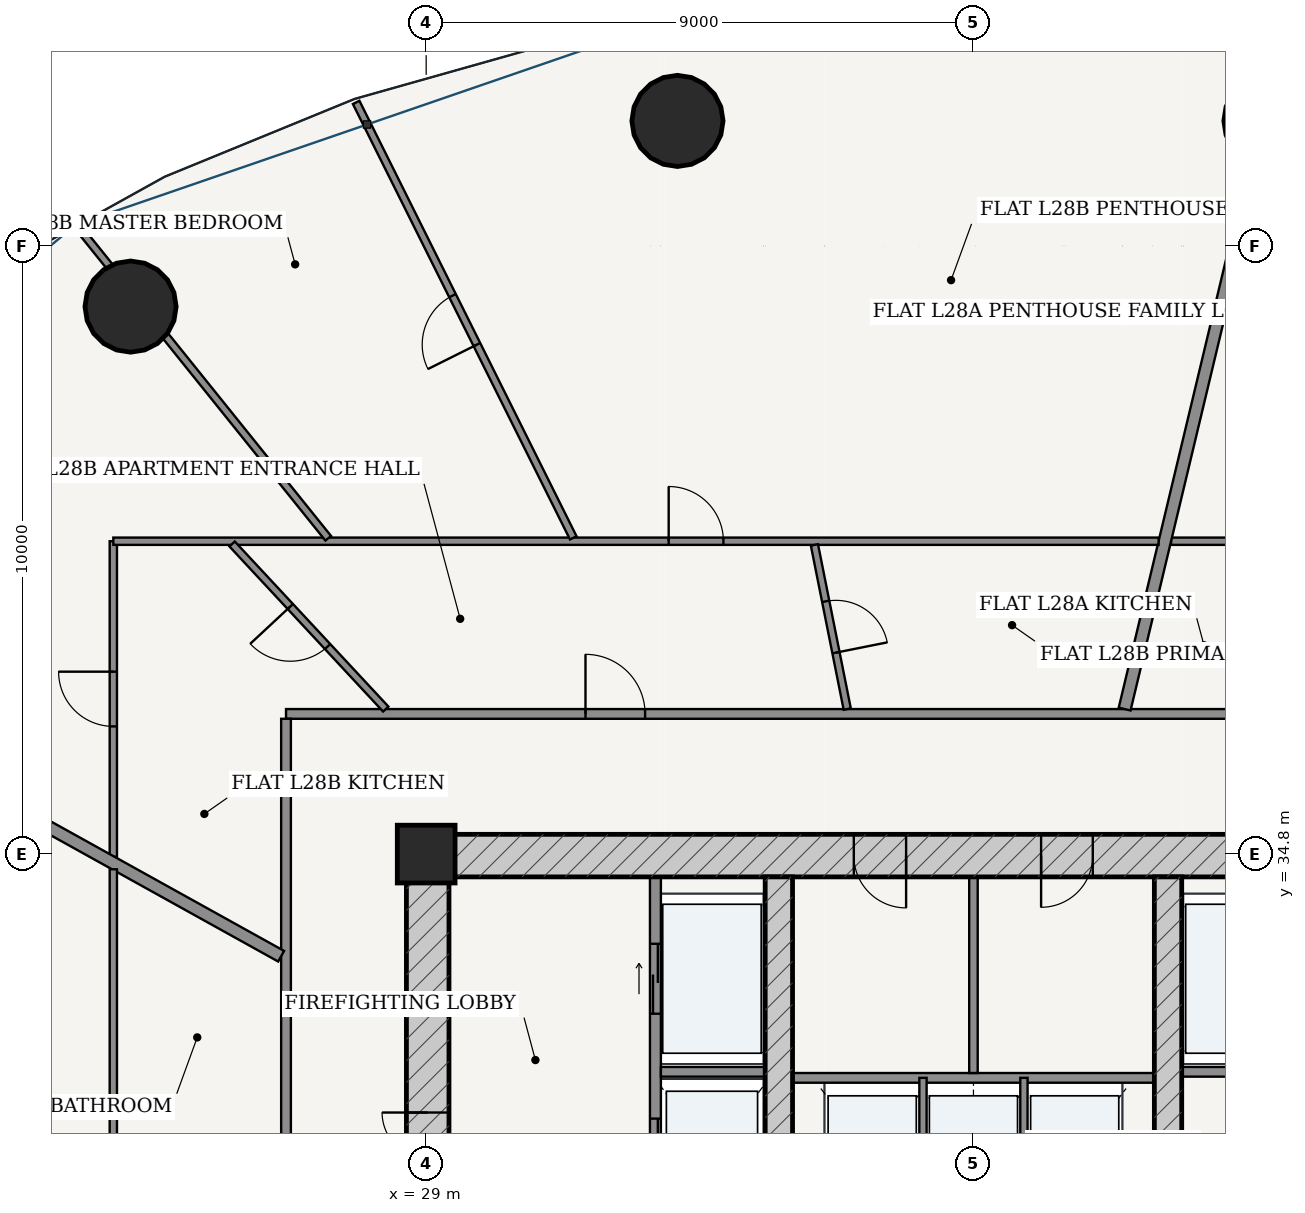
"""IFC4 building model, lengths in metres.
Left out: names, types, materials, properties, quantities, classifications, styles, units other than length and angle.
Written with IfcOpenShell. Run it as: python <this file> out.ifc"""

import sys

from ifc_helpers import new_model, si_unit, direction, frame, frame_2d, origin, origin_2d, place, context, subcontext, project, spatial, rectangle, hollow_circle, extrude, source, transform, mapped, element, fill, save


model = new_model("IFC4")
c1 = context("Model", 3, precision=1e-05, world=origin(), true_north=direction((-0.2419218956, 0.970295726276)))
c2 = subcontext(c1, "Body", "Model", "MODEL_VIEW")
j1 = project(units=[si_unit("LENGTHUNIT", "METRE"), si_unit("PLANEANGLEUNIT", "RADIAN")], contexts=[c1])
p1 = place(None, origin())
s1 = spatial("IfcSite", under=j1, at=p1, CompositionType="ELEMENT")
p2 = place(p1, origin())
s2 = spatial("IfcBuilding", under=s1, at=p2, CompositionType="ELEMENT")
p3 = place(p2, frame((0.0, 0.0, 108.6)))
s3 = spatial("IfcBuildingStorey", under=s2, at=p3, CompositionType="ELEMENT", Elevation=108.6)
p4 = place(p3, frame((29.0, 34.8, 0.0), z_axis=(0.0, 0.0, 1.0), x_axis=(1.0, 0.0, 0.0)))
e1 = element("IfcColumn", 1, at=p4, inside=s3, PredefinedType="COLUMN", context=c2, shape_type="SweptSolid", body=[
    extrude(rectangle(XDim=0.95, YDim=0.95, at=origin_2d()), origin(), (0.0, 0.0, 1.0), 3.6),
])
p5 = place(p3, frame((28.675, 34.775, 0.0), z_axis=(0.0, 0.0, 1.0), x_axis=(1.0, 0.0, 0.0)))
e2 = element("IfcWall", 2, at=p5, inside=s3, PredefinedType="SHEAR", context=c2, shape_type="SweptSolid", body=[
    extrude(rectangle(XDim=18.65, YDim=0.7, at=frame_2d((9.325, 0.0))), origin(), (0.0, 0.0, 1.0), 3.325),
])
p6 = place(p5, frame((7.357, 0.0, 0.0)))
e3 = element("IfcOpeningElement", 3, at=p6, cuts=e2, PredefinedType="OPENING", context=c2, shape_type="SweptSolid", body=[
    extrude(rectangle(XDim=0.86, YDim=2.1, at=frame_2d((0.43, 1.05))), frame((0.0, 0.36, 0.0), z_axis=(0.0, -1.0, 0.0), x_axis=(1.0, 0.0, 0.0)), (0.0, 0.0, 1.0), 0.72),
])
p7 = place(p5, frame((10.438, 0.0, 0.0)))
e4 = element("IfcOpeningElement", 4, at=p7, cuts=e2, PredefinedType="OPENING", context=c2, shape_type="SweptSolid", body=[
    extrude(rectangle(XDim=0.85, YDim=2.1, at=frame_2d((0.425, 1.05))), frame((0.0, 0.36, 0.0), z_axis=(0.0, -1.0, 0.0), x_axis=(1.0, 0.0, 0.0)), (0.0, 0.0, 1.0), 0.72),
])
p8 = place(p3, frame((29.025, 19.175, 0.0), z_axis=(0.0, 0.0, 1.0), x_axis=(0.0, 1.0, 0.0)))
e5 = element("IfcWall", 5, at=p8, inside=s3, PredefinedType="SHEAR", context=c2, shape_type="SweptSolid", body=[
    extrude(rectangle(XDim=15.25, YDim=0.7, at=frame_2d((7.625, 0.0))), origin(), (0.0, 0.0, 1.0), 3.325),
])
p9 = place(p8, frame((9.875, 0.0, 0.0)))
e6 = element("IfcOpeningElement", 6, at=p9, cuts=e5, PredefinedType="OPENING", context=c2, shape_type="SweptSolid", body=[
    extrude(rectangle(XDim=1.5, YDim=2.2, at=frame_2d((0.75, 1.1))), frame((0.0, 0.36, 0.0), z_axis=(0.0, -1.0, 0.0), x_axis=(1.0, 0.0, 0.0)), (0.0, 0.0, 1.0), 0.72),
])
p10 = place(p3, frame((34.8, 19.175, 0.0), z_axis=(0.0, 0.0, 1.0), x_axis=(0.0, 1.0, 0.0)))
e7 = element("IfcWall", 7, at=p10, inside=s3, PredefinedType="SHEAR", context=c2, shape_type="SweptSolid", body=[
    extrude(rectangle(XDim=15.25, YDim=0.45, at=frame_2d((7.625, 0.0))), origin(), (0.0, 0.0, 1.0), 3.325),
])
p11 = place(p10, frame((7.8, 0.0, 0.0)))
e8 = element("IfcOpeningElement", 8, at=p11, cuts=e7, PredefinedType="OPENING", context=c2, shape_type="SweptSolid", body=[
    extrude(rectangle(XDim=1.05, YDim=2.15, at=frame_2d((0.525, 1.075))), frame((0.0, 0.235, 0.0), z_axis=(0.0, -1.0, 0.0), x_axis=(1.0, 0.0, 0.0)), (0.0, 0.0, 1.0), 0.47),
])
p12 = place(p3, frame((41.2, 19.175, 0.0), z_axis=(0.0, 0.0, 1.0), x_axis=(0.0, 1.0, 0.0)))
e9 = element("IfcWall", 9, at=p12, inside=s3, PredefinedType="SHEAR", context=c2, shape_type="SweptSolid", body=[
    extrude(rectangle(XDim=15.25, YDim=0.45, at=frame_2d((7.625, 0.0))), origin(), (0.0, 0.0, 1.0), 3.325),
])
p13 = place(p12, frame((7.8, 0.0, 0.0)))
e10 = element("IfcOpeningElement", 10, at=p13, cuts=e9, PredefinedType="OPENING", context=c2, shape_type="SweptSolid", body=[
    extrude(rectangle(XDim=1.05, YDim=2.15, at=frame_2d((0.525, 1.075))), frame((0.0, 0.235, 0.0), z_axis=(0.0, -1.0, 0.0), x_axis=(1.0, 0.0, 0.0)), (0.0, 0.0, 1.0), 0.47),
])
for number, where, z_axis, x_axis in (
    (11, (42.867, 46.857, 0.0), (0.0, 0.0, 1.0), (1.0, 0.0, 0.0)),
    (12, (33.133, 46.857, 0.0), (0.0, 0.0, 1.0), (1.0, 0.0, 0.0)),
    (13, (24.138, 43.803, 0.0), (0.0, 0.0, 1.0), (1.0, 0.0, 0.0)),
):
    element("IfcColumn", number, at=place(p3, frame(where, z_axis=z_axis, x_axis=x_axis)), inside=s3, PredefinedType="COLUMN", context=c2, shape_type="SweptSolid", body=[
        extrude(hollow_circle(Radius=0.75, WallThickness=0.045, at=origin_2d()), origin(), (0.0, 0.0, 1.0), 3.6),
    ])
p14 = place(p3, frame((32.77, 28.52, 0.0), z_axis=(0.0, 0.0, 1.0), x_axis=(0.0, 1.0, 0.0)))
e14 = element("IfcWall", 14, at=p14, inside=s3, PredefinedType="PARTITIONING", context=c2, shape_type="SweptSolid", body=[
    extrude(rectangle(XDim=5.905, YDim=0.18, at=frame_2d((2.953, 0.0))), origin(), (0.0, 0.0, 1.0), 3.325),
])
p15 = place(p14, frame((3.655, 0.0, 0.0)))
e15 = element("IfcOpeningElement", 15, at=p15, cuts=e14, PredefinedType="OPENING", context=c2, shape_type="SweptSolid", body=[
    extrude(rectangle(XDim=1.15, YDim=2.2, at=frame_2d((0.575, 1.1))), frame((0.0, 0.1, 0.0), z_axis=(0.0, -1.0, 0.0), x_axis=(1.0, 0.0, 0.0)), (0.0, 0.0, 1.0), 0.2),
])
p16 = place(p14, frame((0.73, 0.0, 0.0)))
e16 = element("IfcOpeningElement", 16, at=p16, cuts=e14, PredefinedType="OPENING", context=c2, shape_type="SweptSolid", body=[
    extrude(rectangle(XDim=1.2, YDim=2.25, at=frame_2d((0.6, 1.125))), frame((0.0, 0.1, 0.0), z_axis=(0.0, -1.0, 0.0), x_axis=(1.0, 0.0, 0.0)), (0.0, 0.0, 1.0), 0.2),
])
for number, where, z_axis, x_axis in (
    (17, (32.86, 31.22, 0.0), (0.0, 0.0, 1.0), (1.0, 0.0, 0.0)),
    (18, (41.425, 31.22, 0.0), (0.0, 0.0, 1.0), (1.0, 0.0, 0.0)),
):
    element("IfcWall", number, at=place(p3, frame(where, z_axis=z_axis, x_axis=x_axis)), inside=s3, PredefinedType="PARTITIONING", context=c2, shape_type="SweptSolid", body=[
        extrude(rectangle(XDim=1.715, YDim=0.16, at=frame_2d((0.857, 0.0))), origin(), (0.0, 0.0, 1.0), 3.325),
    ])
p17 = place(p3, frame((35.025, 31.12, 0.0), z_axis=(0.0, 0.0, 1.0), x_axis=(1.0, 0.0, 0.0)))
e19 = element("IfcWall", 19, at=p17, inside=s3, PredefinedType="PARTITIONING", context=c2, shape_type="SweptSolid", body=[
    extrude(rectangle(XDim=5.95, YDim=0.16, at=frame_2d((2.975, 0.0))), origin(), (0.0, 0.0, 1.0), 3.325),
])
for number, where, z_axis, x_axis in (
    (20, (37.17, 28.56, 0.0), (0.0, 0.0, 1.0), (0.0, 1.0, 0.0)),
    (21, (38.83, 28.56, 0.0), (0.0, 0.0, 1.0), (0.0, 1.0, 0.0)),
):
    element("IfcWall", number, at=place(p3, frame(where, z_axis=z_axis, x_axis=x_axis)), inside=s3, PredefinedType="PARTITIONING", context=c2, shape_type="SweptSolid", body=[
        extrude(rectangle(XDim=2.56, YDim=0.12, at=frame_2d((1.28, 0.0))), origin(), (0.0, 0.0, 1.0), 3.325),
    ])
p18 = place(p3, frame((38.0, 31.2, 0.0), z_axis=(0.0, 0.0, 1.0), x_axis=(0.0, 1.0, 0.0)))
e22 = element("IfcWall", 22, at=p18, inside=s3, PredefinedType="PARTITIONING", context=c2, shape_type="SweptSolid", body=[
    extrude(rectangle(XDim=3.225, YDim=0.14, at=frame_2d((1.613, 0.0))), origin(), (0.0, 0.0, 1.0), 3.325),
])
p19 = place(p3, frame((26.695, 37.105, 0.0), z_axis=(0.0, 0.0, 1.0), x_axis=(1.0, 0.0, 0.0)))
e23 = element("IfcWall", 23, at=p19, inside=s3, PredefinedType="PARTITIONING", context=c2, shape_type="SweptSolid", body=[
    extrude(rectangle(XDim=22.61, YDim=0.16, at=frame_2d((11.305, 0.0))), origin(), (0.0, 0.0, 1.0), 2.767),
])
p20 = place(p19, frame((4.925, 0.0, 0.0)))
e24 = element("IfcOpeningElement", 24, at=p20, cuts=e23, PredefinedType="OPENING", context=c2, shape_type="SweptSolid", body=[
    extrude(rectangle(XDim=0.98, YDim=2.2, at=frame_2d((0.49, 1.1))), frame((0.0, 0.09, 0.0), z_axis=(0.0, -1.0, 0.0), x_axis=(1.0, 0.0, 0.0)), (0.0, 0.0, 1.0), 0.18),
])
p21 = place(p3, frame((26.695, 16.575, 0.0), z_axis=(0.0, 0.0, 1.0), x_axis=(0.0, 1.0, 0.0)))
e25 = element("IfcWall", 25, at=p21, inside=s3, PredefinedType="PARTITIONING", context=c2, shape_type="SweptSolid", body=[
    extrude(rectangle(XDim=20.45, YDim=0.16, at=frame_2d((10.225, 0.0))), origin(), (0.0, 0.0, 1.0), 2.767),
])
p22 = place(p21, frame((9.547, 0.0, 0.0)))
e26 = element("IfcOpeningElement", 26, at=p22, cuts=e25, PredefinedType="OPENING", context=c2, shape_type="SweptSolid", body=[
    extrude(rectangle(XDim=0.98, YDim=2.2, at=frame_2d((0.49, 1.1))), frame((0.0, 0.09, 0.0), z_axis=(0.0, -1.0, 0.0), x_axis=(1.0, 0.0, 0.0)), (0.0, 0.0, 1.0), 0.18),
])
p23 = place(p3, frame((41.249, 39.945, 0.0), z_axis=(0.0, 0.0, 1.0), x_axis=(1.0, 0.0, 0.0)))
e27 = element("IfcWall", 27, at=p23, inside=s3, PredefinedType="PARTITIONING", context=c2, shape_type="SweptSolid", body=[
    extrude(rectangle(XDim=10.896, YDim=0.12, at=frame_2d((5.448, 0.0))), origin(), (0.0, 0.0, 1.0), 2.767),
])
p24 = place(p23, frame((1.336, 0.0, 0.0)))
e28 = element("IfcOpeningElement", 28, at=p24, cuts=e27, PredefinedType="OPENING", context=c2, shape_type="SweptSolid", body=[
    extrude(rectangle(XDim=0.9, YDim=2.15, at=frame_2d((0.45, 1.075))), frame((0.0, 0.07, 0.0), z_axis=(0.0, -1.0, 0.0), x_axis=(1.0, 0.0, 0.0)), (0.0, 0.0, 1.0), 0.14),
])
p25 = place(p3, frame((40.486, 37.185, 0.0), z_axis=(0.0, 0.0, 1.0), x_axis=(0.232834224261, 0.972516438942, 0.0)))
e29 = element("IfcWall", 29, at=p25, inside=s3, PredefinedType="PARTITIONING", context=c2, shape_type="SweptSolid", body=[
    extrude(rectangle(XDim=11.502, YDim=0.2, at=frame_2d((5.751, 0.0))), origin(), (0.0, 0.0, 1.0), 2.767),
])
p26 = place(p3, frame((23.855, 34.754, 0.0), z_axis=(0.0, 0.0, 1.0), x_axis=(0.0, 1.0, 0.0)))
e30 = element("IfcWall", 30, at=p26, inside=s3, PredefinedType="PARTITIONING", context=c2, shape_type="SweptSolid", body=[
    extrude(rectangle(XDim=5.191, YDim=0.12, at=frame_2d((2.595, 0.0))), origin(), (0.0, 0.0, 1.0), 3.004),
])
p27 = place(p26, frame((2.145, 0.0, 0.0)))
e31 = element("IfcOpeningElement", 31, at=p27, cuts=e30, PredefinedType="OPENING", context=c2, shape_type="SweptSolid", body=[
    extrude(rectangle(XDim=0.9, YDim=2.15, at=frame_2d((0.45, 1.075))), frame((0.0, 0.07, 0.0), z_axis=(0.0, -1.0, 0.0), x_axis=(1.0, 0.0, 0.0)), (0.0, 0.0, 1.0), 0.14),
])
p28 = place(p3, frame((23.855, 39.945, 0.0), z_axis=(0.0, 0.0, 1.0), x_axis=(1.0, 0.0, 0.0)))
e32 = element("IfcWall", 32, at=p28, inside=s3, PredefinedType="PARTITIONING", context=c2, shape_type="SweptSolid", body=[
    extrude(rectangle(XDim=17.19, YDim=0.12, at=frame_2d((8.595, 0.0))), origin(), (0.0, 0.0, 1.0), 2.767),
])
p29 = place(p28, frame((9.133, 0.0, 0.0)))
e33 = element("IfcOpeningElement", 33, at=p29, cuts=e32, PredefinedType="OPENING", context=c2, shape_type="SweptSolid", body=[
    extrude(rectangle(XDim=0.9, YDim=2.15, at=frame_2d((0.45, 1.075))), frame((0.0, 0.07, 0.0), z_axis=(0.0, -1.0, 0.0), x_axis=(1.0, 0.0, 0.0)), (0.0, 0.0, 1.0), 0.14),
])
p30 = place(p3, frame((31.419, 40.0, 0.0), z_axis=(0.0, 0.0, 1.0), x_axis=(-0.446188142997, 0.894939182877, 0.0)))
e34 = element("IfcWall", 34, at=p30, inside=s3, PredefinedType="PARTITIONING", context=c2, shape_type="SweptSolid", body=[
    extrude(rectangle(XDim=8.002, YDim=0.12, at=frame_2d((4.001, 0.0))), origin(), (0.0, 0.0, 1.0), 2.767),
])
p31 = place(p30, frame((3.551, 0.0, 0.0)))
e35 = element("IfcOpeningElement", 35, at=p31, cuts=e34, PredefinedType="OPENING", context=c2, shape_type="SweptSolid", body=[
    extrude(rectangle(XDim=0.9, YDim=2.15, at=frame_2d((0.45, 1.075))), frame((0.0, 0.07, 0.0), z_axis=(0.0, -1.0, 0.0), x_axis=(1.0, 0.0, 0.0)), (0.0, 0.0, 1.0), 0.14),
])
p32 = place(p3, frame((27.389, 39.993, 0.0), z_axis=(0.0, 0.0, 1.0), x_axis=(-0.626719700294, 0.779244773651, 0.0)))
e36 = element("IfcWall", 36, at=p32, inside=s3, PredefinedType="PARTITIONING", context=c2, shape_type="SweptSolid", body=[
    extrude(rectangle(XDim=6.537, YDim=0.12, at=frame_2d((3.269, 0.0))), origin(), (0.0, 0.0, 1.0), 2.767),
])
p33 = place(p3, frame((35.925, 37.185, 0.0), z_axis=(0.0, 0.0, 1.0), x_axis=(-0.196013794811, 0.980601138202, 0.0)))
e37 = element("IfcWall", 37, at=p33, inside=s3, PredefinedType="PARTITIONING", context=c2, shape_type="SweptSolid", body=[
    extrude(rectangle(XDim=2.753, YDim=0.12, at=frame_2d((1.376, 0.0))), origin(), (0.0, 0.0, 1.0), 3.325),
])
p34 = place(p33, frame((0.946, 0.0, 0.0)))
e38 = element("IfcOpeningElement", 38, at=p34, cuts=e37, PredefinedType="OPENING", context=c2, shape_type="SweptSolid", body=[
    extrude(rectangle(XDim=0.86, YDim=2.15, at=frame_2d((0.43, 1.075))), frame((0.0, 0.07, 0.0), z_axis=(0.0, -1.0, 0.0), x_axis=(1.0, 0.0, 0.0)), (0.0, 0.0, 1.0), 0.14),
])
p35 = place(p3, frame((28.335, 37.185, 0.0), z_axis=(0.0, 0.0, 1.0), x_axis=(-0.681236086606, 0.732063791145, 0.0)))
e39 = element("IfcWall", 39, at=p35, inside=s3, PredefinedType="PARTITIONING", context=c2, shape_type="SweptSolid", body=[
    extrude(rectangle(XDim=3.708, YDim=0.12, at=frame_2d((1.854, 0.0))), origin(), (0.0, 0.0, 1.0), 2.767),
])
p36 = place(p35, frame((1.404, 0.0, 0.0)))
e40 = element("IfcOpeningElement", 40, at=p36, cuts=e39, PredefinedType="OPENING", context=c2, shape_type="SweptSolid", body=[
    extrude(rectangle(XDim=0.9, YDim=2.15, at=frame_2d((0.45, 1.075))), frame((0.0, 0.07, 0.0), z_axis=(0.0, -1.0, 0.0), x_axis=(1.0, 0.0, 0.0)), (0.0, 0.0, 1.0), 0.14),
])
p37 = place(p3, frame((26.615, 33.12, 0.0), z_axis=(0.0, 0.0, 1.0), x_axis=(-0.874319192772, 0.485351366692, 0.0)))
e41 = element("IfcWall", 41, at=p37, inside=s3, PredefinedType="PARTITIONING", context=c2, shape_type="SweptSolid", body=[
    extrude(rectangle(XDim=12.158, YDim=0.2, at=frame_2d((6.079, 0.0))), origin(), (0.0, 0.0, 1.0), 2.767),
])
p38 = place(p3, frame((23.855, 19.05, 0.0), z_axis=(0.0, 0.0, 1.0), x_axis=(0.0, 1.0, 0.0)))
e42 = element("IfcWall", 42, at=p38, inside=s3, PredefinedType="PARTITIONING", context=c2, shape_type="SweptSolid", body=[
    extrude(rectangle(XDim=15.501, YDim=0.12, at=frame_2d((7.75, 0.0))), origin(), (0.0, 0.0, 1.0), 2.767),
])
p39 = place(p38, frame((8.705, 0.0, 0.0)))
e43 = element("IfcOpeningElement", 43, at=p39, cuts=e42, PredefinedType="OPENING", context=c2, shape_type="SweptSolid", body=[
    extrude(rectangle(XDim=0.9, YDim=2.15, at=frame_2d((0.45, 1.075))), frame((0.0, 0.07, 0.0), z_axis=(0.0, -1.0, 0.0), x_axis=(1.0, 0.0, 0.0)), (0.0, 0.0, 1.0), 0.14),
])
p40 = place(p38, frame((1.111, 0.0, 0.0)))
e44 = element("IfcOpeningElement", 44, at=p40, cuts=e42, PredefinedType="OPENING", context=c2, shape_type="SweptSolid", body=[
    extrude(rectangle(XDim=0.9, YDim=2.15, at=frame_2d((0.45, 1.075))), frame((0.0, 0.07, 0.0), z_axis=(0.0, -1.0, 0.0), x_axis=(1.0, 0.0, 0.0)), (0.0, 0.0, 1.0), 0.14),
])
m1 = source(origin(), c2, "Body", "SweptSolid", [
    extrude(rectangle(XDim=1.5, YDim=2.2, at=frame_2d((0.75, 1.1))), frame((0.0, 0.025, 0.0), z_axis=(0.0, -1.0, 0.0), x_axis=(1.0, 0.0, 0.0)), (0.0, 0.0, 1.0), 0.05),
])
p41 = place(p9, origin())
e45 = element("IfcDoor", 45, at=p41, inside=s3, OperationType="DOUBLE_DOOR_SINGLE_SWING", PredefinedType="DOOR", context=c2, shape_type="MappedRepresentation", body=[
    mapped(m1, transform((0.0, 0.0, 0.0), scale=1.0)),
])
fill(e6, e45)
m2 = source(origin(), c2, "Body", "SweptSolid", [
    extrude(rectangle(XDim=0.86, YDim=2.1, at=frame_2d((0.43, 1.05))), frame((0.0, 0.025, 0.0), z_axis=(0.0, -1.0, 0.0), x_axis=(1.0, 0.0, 0.0)), (0.0, 0.0, 1.0), 0.05),
])
p42 = place(p6, frame((0.86, 0.0, 0.0), z_axis=(0.0, 0.0, 1.0), x_axis=(-1.0, 0.0, 0.0)))
e46 = element("IfcDoor", 46, at=p42, inside=s3, OperationType="SINGLE_SWING_LEFT", PredefinedType="DOOR", context=c2, shape_type="MappedRepresentation", body=[
    mapped(m2, transform((0.0, 0.0, 0.0), scale=1.0)),
])
fill(e3, e46)
m3 = source(origin(), c2, "Body", "SweptSolid", [
    extrude(rectangle(XDim=0.85, YDim=2.1, at=frame_2d((0.425, 1.05))), frame((0.0, 0.025, 0.0), z_axis=(0.0, -1.0, 0.0), x_axis=(1.0, 0.0, 0.0)), (0.0, 0.0, 1.0), 0.05),
])
p43 = place(p7, frame((0.85, 0.0, 0.0), z_axis=(0.0, 0.0, 1.0), x_axis=(-1.0, 0.0, 0.0)))
e47 = element("IfcDoor", 47, at=p43, inside=s3, OperationType="SINGLE_SWING_RIGHT", PredefinedType="DOOR", context=c2, shape_type="MappedRepresentation", body=[
    mapped(m3, transform((0.0, 0.0, 0.0), scale=1.0)),
])
fill(e4, e47)
m4 = source(origin(), c2, "Body", "SweptSolid", [
    extrude(rectangle(XDim=1.15, YDim=2.2, at=frame_2d((0.575, 1.1))), frame((0.0, 0.025, 0.0), z_axis=(0.0, -1.0, 0.0), x_axis=(1.0, 0.0, 0.0)), (0.0, 0.0, 1.0), 0.05),
])
p44 = place(p15, origin())
e48 = element("IfcDoor", 48, at=p44, inside=s3, OperationType="DOUBLE_DOOR_SLIDING", PredefinedType="DOOR", context=c2, shape_type="MappedRepresentation", body=[
    mapped(m4, transform((0.0, 0.0, 0.0), scale=1.0)),
])
fill(e15, e48)
m5 = source(origin(), c2, "Body", "SweptSolid", [
    extrude(rectangle(XDim=1.2, YDim=2.25, at=frame_2d((0.6, 1.125))), frame((0.0, 0.025, 0.0), z_axis=(0.0, -1.0, 0.0), x_axis=(1.0, 0.0, 0.0)), (0.0, 0.0, 1.0), 0.05),
])
p45 = place(p16, origin())
e49 = element("IfcDoor", 49, at=p45, inside=s3, OperationType="DOUBLE_DOOR_SLIDING", PredefinedType="DOOR", context=c2, shape_type="MappedRepresentation", body=[
    mapped(m5, transform((0.0, 0.0, 0.0), scale=1.0)),
])
fill(e16, e49)
m6 = source(origin(), c2, "Body", "SweptSolid", [
    extrude(rectangle(XDim=0.98, YDim=2.2, at=frame_2d((0.49, 1.1))), frame((0.0, 0.025, 0.0), z_axis=(0.0, -1.0, 0.0), x_axis=(1.0, 0.0, 0.0)), (0.0, 0.0, 1.0), 0.05),
])
p46 = place(p20, origin())
e50 = element("IfcDoor", 50, at=p46, inside=s3, OperationType="SINGLE_SWING_LEFT", PredefinedType="DOOR", context=c2, shape_type="MappedRepresentation", body=[
    mapped(m6, transform((0.0, 0.0, 0.0), scale=1.0)),
])
fill(e24, e50)
m7 = source(origin(), c2, "Body", "SweptSolid", [
    extrude(rectangle(XDim=0.86, YDim=2.15, at=frame_2d((0.43, 1.075))), frame((0.0, 0.025, 0.0), z_axis=(0.0, -1.0, 0.0), x_axis=(1.0, 0.0, 0.0)), (0.0, 0.0, 1.0), 0.05),
])
p47 = place(p34, frame((0.86, 0.0, 0.0), z_axis=(0.0, 0.0, 1.0), x_axis=(-1.0, 0.0, 0.0)))
e51 = element("IfcDoor", 51, at=p47, inside=s3, OperationType="SINGLE_SWING_RIGHT", PredefinedType="DOOR", context=c2, shape_type="MappedRepresentation", body=[
    mapped(m7, transform((0.0, 0.0, 0.0), scale=1.0)),
])
fill(e38, e51)
m8 = source(origin(), c2, "Body", "SweptSolid", [
    extrude(rectangle(XDim=0.9, YDim=2.15, at=frame_2d((0.45, 1.075))), frame((0.0, 0.025, 0.0), z_axis=(0.0, -1.0, 0.0), x_axis=(1.0, 0.0, 0.0)), (0.0, 0.0, 1.0), 0.05),
])
p48 = place(p29, origin())
e52 = element("IfcDoor", 52, at=p48, inside=s3, OperationType="SINGLE_SWING_LEFT", PredefinedType="DOOR", context=c2, shape_type="MappedRepresentation", body=[
    mapped(m8, transform((0.0, 0.0, 0.0), scale=1.0)),
])
fill(e33, e52)
p49 = place(p36, origin())
e53 = element("IfcDoor", 53, at=p49, inside=s3, OperationType="SINGLE_SWING_RIGHT", PredefinedType="DOOR", context=c2, shape_type="MappedRepresentation", body=[
    mapped(m8, transform((0.0, 0.0, 0.0), scale=1.0)),
])
fill(e40, e53)
p50 = place(p31, origin())
e54 = element("IfcDoor", 54, at=p50, inside=s3, OperationType="SINGLE_SWING_LEFT", PredefinedType="DOOR", context=c2, shape_type="MappedRepresentation", body=[
    mapped(m8, transform((0.0, 0.0, 0.0), scale=1.0)),
])
fill(e35, e54)
p51 = place(p27, origin())
e55 = element("IfcDoor", 55, at=p51, inside=s3, OperationType="SINGLE_SWING_RIGHT", PredefinedType="DOOR", context=c2, shape_type="MappedRepresentation", body=[
    mapped(m8, transform((0.0, 0.0, 0.0), scale=1.0)),
])
fill(e31, e55)
save(model, sys.argv[1])
